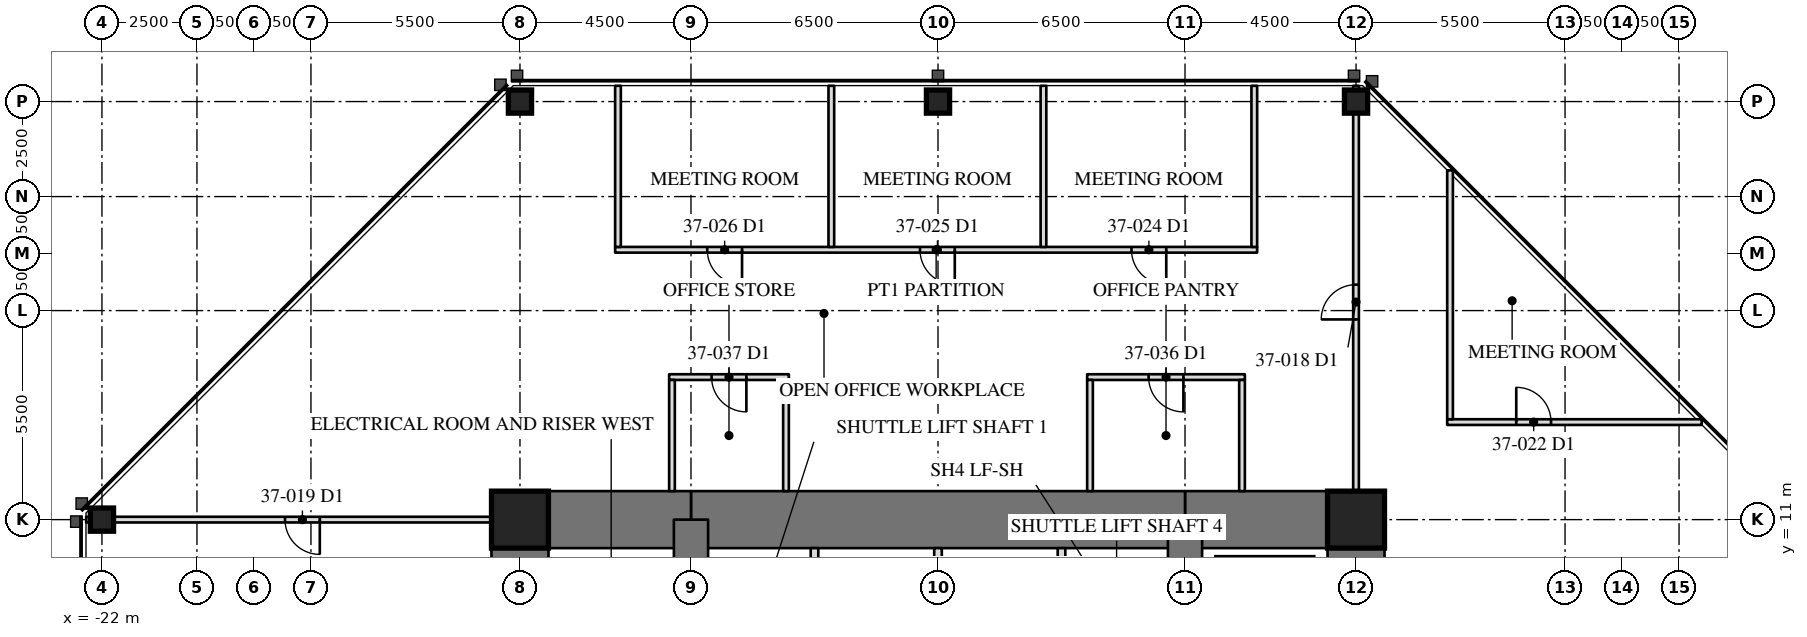
"""IFC4 building model, lengths in metres.
Left out: names, types, materials, properties, quantities, classifications, styles, units other than length and angle.
Written with IfcOpenShell. Run it as: python <this file> out.ifc"""

import sys

from ifc_helpers import new_model, si_unit, direction, frame, frame_2d, origin, origin_2d, place, context, subcontext, project, spatial, rectangle, hollow_rectangle, extrude, element, fill, save


model = new_model("IFC4")
c1 = context("Model", 3, precision=1e-05, world=origin(), true_north=direction((0.0, 1.0)))
c2 = subcontext(c1, "Body", "Model", "MODEL_VIEW")
j1 = project(units=[si_unit("LENGTHUNIT", "METRE"), si_unit("PLANEANGLEUNIT", "RADIAN")], contexts=[c1])
p1 = place(None, origin())
s1 = spatial("IfcSite", under=j1, at=p1, CompositionType="ELEMENT")
p2 = place(p1, origin())
s2 = spatial("IfcBuilding", under=s1, at=p2, CompositionType="ELEMENT")
p3 = place(p2, frame((0.0, 0.0, 158.2)))
s3 = spatial("IfcBuildingStorey", under=s2, at=p3, CompositionType="ELEMENT", Elevation=158.2)
for number, where, z_axis, x_axis in (
    (1, (11.0, 22.0, 0.0), (0.0, 0.0, 1.0), (1.0, 0.0, 0.0)),
    (2, (0.0, 22.0, 0.0), (0.0, 0.0, 1.0), (1.0, 0.0, 0.0)),
    (3, (-11.0, 22.0, 0.0), (0.0, 0.0, 1.0), (1.0, 0.0, 0.0)),
    (4, (-22.0, 11.0, 0.0), (0.0, 0.0, 1.0), (0.0, 1.0, 0.0)),
):
    element("IfcColumn", number, at=place(p3, frame(where, z_axis=z_axis, x_axis=x_axis)), inside=s3, PredefinedType="COLUMN", context=c2, shape_type="SweptSolid", body=[
        extrude(hollow_rectangle(XDim=0.61, YDim=0.61, WallThickness=0.076, at=origin_2d()), origin(), (0.0, 0.0, 1.0), 4.1),
    ])
p4 = place(p3, frame((11.0, -11.0, 0.0), z_axis=(0.0, 0.0, 1.0), x_axis=(0.0, 1.0, 0.0)))
e5 = element("IfcWall", 5, at=p4, inside=s3, PredefinedType="SHEAR", context=c2, shape_type="SweptSolid", body=[
    extrude(rectangle(XDim=22.0, YDim=1.5, at=frame_2d((11.0, 0.0))), origin(), (0.0, 0.0, 1.0), 4.1),
])
p5 = place(p4, frame((15.393, 0.0, 0.0)))
e6 = element("IfcOpeningElement", 6, at=p5, cuts=e5, PredefinedType="OPENING", context=c2, shape_type="SweptSolid", body=[
    extrude(rectangle(XDim=0.915, YDim=2.134, at=frame_2d((0.458, 1.067))), frame((0.0, 0.76, 0.0), z_axis=(0.0, -1.0, 0.0), x_axis=(1.0, 0.0, 0.0)), (0.0, 0.0, 1.0), 1.52),
])
p6 = place(p3, frame((-11.0, 11.0, 0.0), z_axis=(0.0, 0.0, 1.0), x_axis=(0.0, -1.0, 0.0)))
e7 = element("IfcWall", 7, at=p6, inside=s3, PredefinedType="SHEAR", context=c2, shape_type="SweptSolid", body=[
    extrude(rectangle(XDim=22.0, YDim=1.5, at=frame_2d((11.0, 0.0))), origin(), (0.0, 0.0, 1.0), 4.1),
])
p7 = place(p6, frame((15.393, 0.0, 0.0)))
e8 = element("IfcOpeningElement", 8, at=p7, cuts=e7, PredefinedType="OPENING", context=c2, shape_type="SweptSolid", body=[
    extrude(rectangle(XDim=0.915, YDim=2.134, at=frame_2d((0.458, 1.067))), frame((0.0, 0.76, 0.0), z_axis=(0.0, -1.0, 0.0), x_axis=(1.0, 0.0, 0.0)), (0.0, 0.0, 1.0), 1.52),
])
p8 = place(p3, frame((11.0, 11.0, 0.0), z_axis=(0.0, 0.0, 1.0), x_axis=(-1.0, 0.0, 0.0)))
e9 = element("IfcWall", 9, at=p8, inside=s3, PredefinedType="SHEAR", context=c2, shape_type="SweptSolid", body=[
    extrude(rectangle(XDim=4.5, YDim=1.5, at=frame_2d((2.25, 0.0))), origin(), (0.0, 0.0, 1.0), 4.1),
])
p9 = place(p3, frame((6.5, 11.0, 0.0), z_axis=(0.0, 0.0, 1.0), x_axis=(-1.0, 0.0, 0.0)))
e10 = element("IfcWall", 10, at=p9, inside=s3, PredefinedType="SHEAR", context=c2, shape_type="SweptSolid", body=[
    extrude(rectangle(XDim=13.0, YDim=1.5, at=frame_2d((6.5, 0.0))), origin(), (0.0, 0.0, 1.0), 4.1),
])
p10 = place(p3, frame((-6.5, 11.0, 0.0), z_axis=(0.0, 0.0, 1.0), x_axis=(-1.0, 0.0, 0.0)))
e11 = element("IfcWall", 11, at=p10, inside=s3, PredefinedType="SHEAR", context=c2, shape_type="SweptSolid", body=[
    extrude(rectangle(XDim=4.5, YDim=1.5, at=frame_2d((2.25, 0.0))), origin(), (0.0, 0.0, 1.0), 4.1),
])
for number, where, z_axis, x_axis in (
    (12, (6.5, 6.5, 0.0), (0.0, 0.0, 1.0), (0.0, 1.0, 0.0)),
    (13, (-6.5, 11.0, 0.0), (0.0, 0.0, 1.0), (0.0, -1.0, 0.0)),
):
    element("IfcWall", number, at=place(p3, frame(where, z_axis=z_axis, x_axis=x_axis)), inside=s3, PredefinedType="SHEAR", context=c2, shape_type="SweptSolid", body=[
        extrude(rectangle(XDim=4.5, YDim=0.9, at=frame_2d((2.25, 0.0))), origin(), (0.0, 0.0, 1.0), 4.1),
    ])
for number, where, z_axis, x_axis in (
    (14, (11.0, 11.0, 0.0), (0.0, 0.0, 1.0), (1.0, 0.0, 0.0)),
    (15, (-11.0, 11.0, 0.0), (0.0, 0.0, 1.0), (1.0, 0.0, 0.0)),
):
    element("IfcColumn", number, at=place(p3, frame(where, z_axis=z_axis, x_axis=x_axis)), inside=s3, PredefinedType="COLUMN", context=c2, shape_type="SweptSolid", body=[
        extrude(hollow_rectangle(XDim=1.499, YDim=1.499, WallThickness=0.102, at=origin_2d()), origin(), (0.0, 0.0, 1.0), 4.1),
    ])
for number, where, z_axis, x_axis in (
    (16, (-3.25, 6.95, 0.0), (0.0, 0.0, 1.0), (0.0, 1.0, 0.0)),
    (17, (0.0, 6.95, 0.0), (0.0, 0.0, 1.0), (0.0, 1.0, 0.0)),
    (18, (3.25, 6.95, 0.0), (0.0, 0.0, 1.0), (0.0, 1.0, 0.0)),
):
    element("IfcWall", number, at=place(p3, frame(where, z_axis=z_axis, x_axis=x_axis)), inside=s3, PredefinedType="PARTITIONING", context=c2, shape_type="SweptSolid", body=[
        extrude(rectangle(XDim=3.3, YDim=0.2, at=frame_2d((1.65, 0.0))), origin(), (0.0, 0.0, 1.0), 3.91),
    ])
p11 = place(p3, frame((11.0, 11.75, 0.0), z_axis=(0.0, 0.0, 1.0), x_axis=(0.0, 1.0, 0.0)))
e19 = element("IfcWall", 19, at=p11, inside=s3, PredefinedType="PARTITIONING", context=c2, shape_type="SweptSolid", body=[
    extrude(rectangle(XDim=10.665, YDim=0.15, at=frame_2d((5.333, 0.0))), origin(), (0.0, 0.0, 1.0), 3.326),
])
p12 = place(p11, frame((4.518, 0.0, 0.0)))
e20 = element("IfcOpeningElement", 20, at=p12, cuts=e19, PredefinedType="OPENING", context=c2, shape_type="SweptSolid", body=[
    extrude(rectangle(XDim=0.915, YDim=2.134, at=frame_2d((0.458, 1.067))), frame((0.0, 0.085, 0.0), z_axis=(0.0, -1.0, 0.0), x_axis=(1.0, 0.0, 0.0)), (0.0, 0.0, 1.0), 0.17),
])
p13 = place(p3, frame((-11.75, 11.0, 0.0), z_axis=(0.0, 0.0, 1.0), x_axis=(-1.0, 0.0, 0.0)))
e21 = element("IfcWall", 21, at=p13, inside=s3, PredefinedType="PARTITIONING", context=c2, shape_type="SweptSolid", body=[
    extrude(rectangle(XDim=10.665, YDim=0.15, at=frame_2d((5.333, 0.0))), origin(), (0.0, 0.0, 1.0), 3.326),
])
p14 = place(p13, frame((4.518, 0.0, 0.0)))
e22 = element("IfcOpeningElement", 22, at=p14, cuts=e21, PredefinedType="OPENING", context=c2, shape_type="SweptSolid", body=[
    extrude(rectangle(XDim=0.915, YDim=2.134, at=frame_2d((0.458, 1.067))), frame((0.0, 0.085, 0.0), z_axis=(0.0, -1.0, 0.0), x_axis=(1.0, 0.0, 0.0)), (0.0, 0.0, 1.0), 0.17),
])
p15 = place(p3, frame((13.399, 13.566, 0.0), z_axis=(0.0, 0.0, 1.0), x_axis=(1.0, 0.0, 0.0)))
e23 = element("IfcWall", 23, at=p15, inside=s3, PredefinedType="PARTITIONING", context=c2, shape_type="SweptSolid", body=[
    extrude(rectangle(XDim=6.698, YDim=0.15, at=frame_2d((3.349, 0.0))), origin(), (0.0, 0.0, 1.0), 3.91),
])
p16 = place(p15, frame((1.817, 0.0, 0.0)))
e24 = element("IfcOpeningElement", 24, at=p16, cuts=e23, PredefinedType="OPENING", context=c2, shape_type="SweptSolid", body=[
    extrude(rectangle(XDim=0.915, YDim=2.134, at=frame_2d((0.458, 1.067))), frame((0.0, 0.085, 0.0), z_axis=(0.0, -1.0, 0.0), x_axis=(1.0, 0.0, 0.0)), (0.0, 0.0, 1.0), 0.17),
])
p17 = place(p3, frame((13.474, 13.641, 0.0), z_axis=(0.0, 0.0, 1.0), x_axis=(0.0, 1.0, 0.0)))
e25 = element("IfcWall", 25, at=p17, inside=s3, PredefinedType="PARTITIONING", context=c2, shape_type="SweptSolid", body=[
    extrude(rectangle(XDim=6.548, YDim=0.15, at=frame_2d((3.274, 0.0))), origin(), (0.0, 0.0, 1.0), 3.91),
])
p18 = place(p3, frame((8.398, 18.1, 0.0), z_axis=(0.0, 0.0, 1.0), x_axis=(-1.0, 0.0, 0.0)))
e26 = element("IfcWall", 26, at=p18, inside=s3, PredefinedType="PARTITIONING", context=c2, shape_type="SweptSolid", body=[
    extrude(rectangle(XDim=16.894, YDim=0.15, at=frame_2d((8.447, 0.0))), origin(), (0.0, 0.0, 1.0), 3.91),
])
p19 = place(p18, frame((2.392, 0.0, 0.0)))
e27 = element("IfcOpeningElement", 27, at=p19, cuts=e26, PredefinedType="OPENING", context=c2, shape_type="SweptSolid", body=[
    extrude(rectangle(XDim=0.915, YDim=2.134, at=frame_2d((0.458, 1.067))), frame((0.0, 0.085, 0.0), z_axis=(0.0, -1.0, 0.0), x_axis=(1.0, 0.0, 0.0)), (0.0, 0.0, 1.0), 0.17),
])
p20 = place(p18, frame((7.957, 0.0, 0.0)))
e28 = element("IfcOpeningElement", 28, at=p20, cuts=e26, PredefinedType="OPENING", context=c2, shape_type="SweptSolid", body=[
    extrude(rectangle(XDim=0.915, YDim=2.134, at=frame_2d((0.458, 1.067))), frame((0.0, 0.085, 0.0), z_axis=(0.0, -1.0, 0.0), x_axis=(1.0, 0.0, 0.0)), (0.0, 0.0, 1.0), 0.17),
])
p21 = place(p18, frame((13.554, 0.0, 0.0)))
e29 = element("IfcOpeningElement", 29, at=p21, cuts=e26, PredefinedType="OPENING", context=c2, shape_type="SweptSolid", body=[
    extrude(rectangle(XDim=0.915, YDim=2.134, at=frame_2d((0.458, 1.067))), frame((0.0, 0.085, 0.0), z_axis=(0.0, -1.0, 0.0), x_axis=(1.0, 0.0, 0.0)), (0.0, 0.0, 1.0), 0.17),
])
for number, where, z_axis, x_axis in (
    (30, (8.323, 18.175, 0.0), (0.0, 0.0, 1.0), (0.0, 1.0, 0.0)),
    (31, (2.775, 18.175, 0.0), (0.0, 0.0, 1.0), (0.0, 1.0, 0.0)),
    (32, (-2.807, 18.175, 0.0), (0.0, 0.0, 1.0), (0.0, 1.0, 0.0)),
    (33, (-8.421, 18.175, 0.0), (0.0, 0.0, 1.0), (0.0, 1.0, 0.0)),
):
    element("IfcWall", number, at=place(p3, frame(where, z_axis=z_axis, x_axis=x_axis)), inside=s3, PredefinedType="PARTITIONING", context=c2, shape_type="SweptSolid", body=[
        extrude(rectangle(XDim=4.24, YDim=0.15, at=frame_2d((2.12, 0.0))), origin(), (0.0, 0.0, 1.0), 3.91),
    ])
p22 = place(p3, frame((8.075, 14.75, 0.0), z_axis=(0.0, 0.0, 1.0), x_axis=(-1.0, 0.0, 0.0)))
e34 = element("IfcWall", 34, at=p22, inside=s3, PredefinedType="PARTITIONING", context=c2, shape_type="SweptSolid", body=[
    extrude(rectangle(XDim=4.15, YDim=0.15, at=frame_2d((2.075, 0.0))), origin(), (0.0, 0.0, 1.0), 3.91),
])
p23 = place(p22, frame((1.617, 0.0, 0.0)))
e35 = element("IfcOpeningElement", 35, at=p23, cuts=e34, PredefinedType="OPENING", context=c2, shape_type="SweptSolid", body=[
    extrude(rectangle(XDim=0.915, YDim=2.134, at=frame_2d((0.458, 1.067))), frame((0.0, 0.085, 0.0), z_axis=(0.0, -1.0, 0.0), x_axis=(1.0, 0.0, 0.0)), (0.0, 0.0, 1.0), 0.17),
])
for number, where, z_axis, x_axis in (
    (36, (8.0, 14.675, 0.0), (0.0, 0.0, 1.0), (0.0, -1.0, 0.0)),
    (37, (4.0, 14.675, 0.0), (0.0, 0.0, 1.0), (0.0, -1.0, 0.0)),
):
    element("IfcWall", number, at=place(p3, frame(where, z_axis=z_axis, x_axis=x_axis)), inside=s3, PredefinedType="PARTITIONING", context=c2, shape_type="SweptSolid", body=[
        extrude(rectangle(XDim=2.925, YDim=0.15, at=frame_2d((1.462, 0.0))), origin(), (0.0, 0.0, 1.0), 3.91),
    ])
p24 = place(p3, frame((-3.925, 14.75, 0.0), z_axis=(0.0, 0.0, 1.0), x_axis=(-1.0, 0.0, 0.0)))
e38 = element("IfcWall", 38, at=p24, inside=s3, PredefinedType="PARTITIONING", context=c2, shape_type="SweptSolid", body=[
    extrude(rectangle(XDim=3.15, YDim=0.15, at=frame_2d((1.575, 0.0))), origin(), (0.0, 0.0, 1.0), 3.91),
])
p25 = place(p24, frame((1.117, 0.0, 0.0)))
e39 = element("IfcOpeningElement", 39, at=p25, cuts=e38, PredefinedType="OPENING", context=c2, shape_type="SweptSolid", body=[
    extrude(rectangle(XDim=0.915, YDim=2.134, at=frame_2d((0.458, 1.067))), frame((0.0, 0.085, 0.0), z_axis=(0.0, -1.0, 0.0), x_axis=(1.0, 0.0, 0.0)), (0.0, 0.0, 1.0), 0.17),
])
for number, where, z_axis, x_axis in (
    (40, (-4.0, 14.675, 0.0), (0.0, 0.0, 1.0), (0.0, -1.0, 0.0)),
    (41, (-7.0, 14.675, 0.0), (0.0, 0.0, 1.0), (0.0, -1.0, 0.0)),
):
    element("IfcWall", number, at=place(p3, frame(where, z_axis=z_axis, x_axis=x_axis)), inside=s3, PredefinedType="PARTITIONING", context=c2, shape_type="SweptSolid", body=[
        extrude(rectangle(XDim=2.925, YDim=0.15, at=frame_2d((1.462, 0.0))), origin(), (0.0, 0.0, 1.0), 3.91),
    ])
p26 = place(p12, origin())
e42 = element("IfcDoor", 42, at=p26, inside=s3, OperationType="SINGLE_SWING_LEFT", PredefinedType="DOOR", context=c2, shape_type="SweptSolid", body=[
    extrude(rectangle(XDim=0.915, YDim=2.134, at=frame_2d((0.458, 1.067))), frame((0.0, 0.025, 0.0), z_axis=(0.0, -1.0, 0.0), x_axis=(1.0, 0.0, 0.0)), (0.0, 0.0, 1.0), 0.05),
])
fill(e20, e42)
p27 = place(p14, origin())
e43 = element("IfcDoor", 43, at=p27, inside=s3, OperationType="SINGLE_SWING_LEFT", PredefinedType="DOOR", context=c2, shape_type="SweptSolid", body=[
    extrude(rectangle(XDim=0.915, YDim=2.134, at=frame_2d((0.458, 1.067))), frame((0.0, 0.025, 0.0), z_axis=(0.0, -1.0, 0.0), x_axis=(1.0, 0.0, 0.0)), (0.0, 0.0, 1.0), 0.05),
])
fill(e22, e43)
p28 = place(p16, origin())
e44 = element("IfcDoor", 44, at=p28, inside=s3, OperationType="SINGLE_SWING_LEFT", PredefinedType="DOOR", context=c2, shape_type="SweptSolid", body=[
    extrude(rectangle(XDim=0.915, YDim=2.134, at=frame_2d((0.458, 1.067))), frame((0.0, 0.025, 0.0), z_axis=(0.0, -1.0, 0.0), x_axis=(1.0, 0.0, 0.0)), (0.0, 0.0, 1.0), 0.05),
])
fill(e24, e44)
p29 = place(p19, origin())
e45 = element("IfcDoor", 45, at=p29, inside=s3, OperationType="SINGLE_SWING_LEFT", PredefinedType="DOOR", context=c2, shape_type="SweptSolid", body=[
    extrude(rectangle(XDim=0.915, YDim=2.134, at=frame_2d((0.458, 1.067))), frame((0.0, 0.025, 0.0), z_axis=(0.0, -1.0, 0.0), x_axis=(1.0, 0.0, 0.0)), (0.0, 0.0, 1.0), 0.05),
])
fill(e27, e45)
p30 = place(p20, origin())
e46 = element("IfcDoor", 46, at=p30, inside=s3, OperationType="SINGLE_SWING_LEFT", PredefinedType="DOOR", context=c2, shape_type="SweptSolid", body=[
    extrude(rectangle(XDim=0.915, YDim=2.134, at=frame_2d((0.458, 1.067))), frame((0.0, 0.025, 0.0), z_axis=(0.0, -1.0, 0.0), x_axis=(1.0, 0.0, 0.0)), (0.0, 0.0, 1.0), 0.05),
])
fill(e28, e46)
p31 = place(p21, origin())
e47 = element("IfcDoor", 47, at=p31, inside=s3, OperationType="SINGLE_SWING_LEFT", PredefinedType="DOOR", context=c2, shape_type="SweptSolid", body=[
    extrude(rectangle(XDim=0.915, YDim=2.134, at=frame_2d((0.458, 1.067))), frame((0.0, 0.025, 0.0), z_axis=(0.0, -1.0, 0.0), x_axis=(1.0, 0.0, 0.0)), (0.0, 0.0, 1.0), 0.05),
])
fill(e29, e47)
p32 = place(p23, origin())
e48 = element("IfcDoor", 48, at=p32, inside=s3, OperationType="SINGLE_SWING_LEFT", PredefinedType="DOOR", context=c2, shape_type="SweptSolid", body=[
    extrude(rectangle(XDim=0.915, YDim=2.134, at=frame_2d((0.458, 1.067))), frame((0.0, 0.025, 0.0), z_axis=(0.0, -1.0, 0.0), x_axis=(1.0, 0.0, 0.0)), (0.0, 0.0, 1.0), 0.05),
])
fill(e35, e48)
p33 = place(p25, origin())
e49 = element("IfcDoor", 49, at=p33, inside=s3, OperationType="SINGLE_SWING_LEFT", PredefinedType="DOOR", context=c2, shape_type="SweptSolid", body=[
    extrude(rectangle(XDim=0.915, YDim=2.134, at=frame_2d((0.458, 1.067))), frame((0.0, 0.025, 0.0), z_axis=(0.0, -1.0, 0.0), x_axis=(1.0, 0.0, 0.0)), (0.0, 0.0, 1.0), 0.05),
])
fill(e39, e49)
save(model, sys.argv[1])
